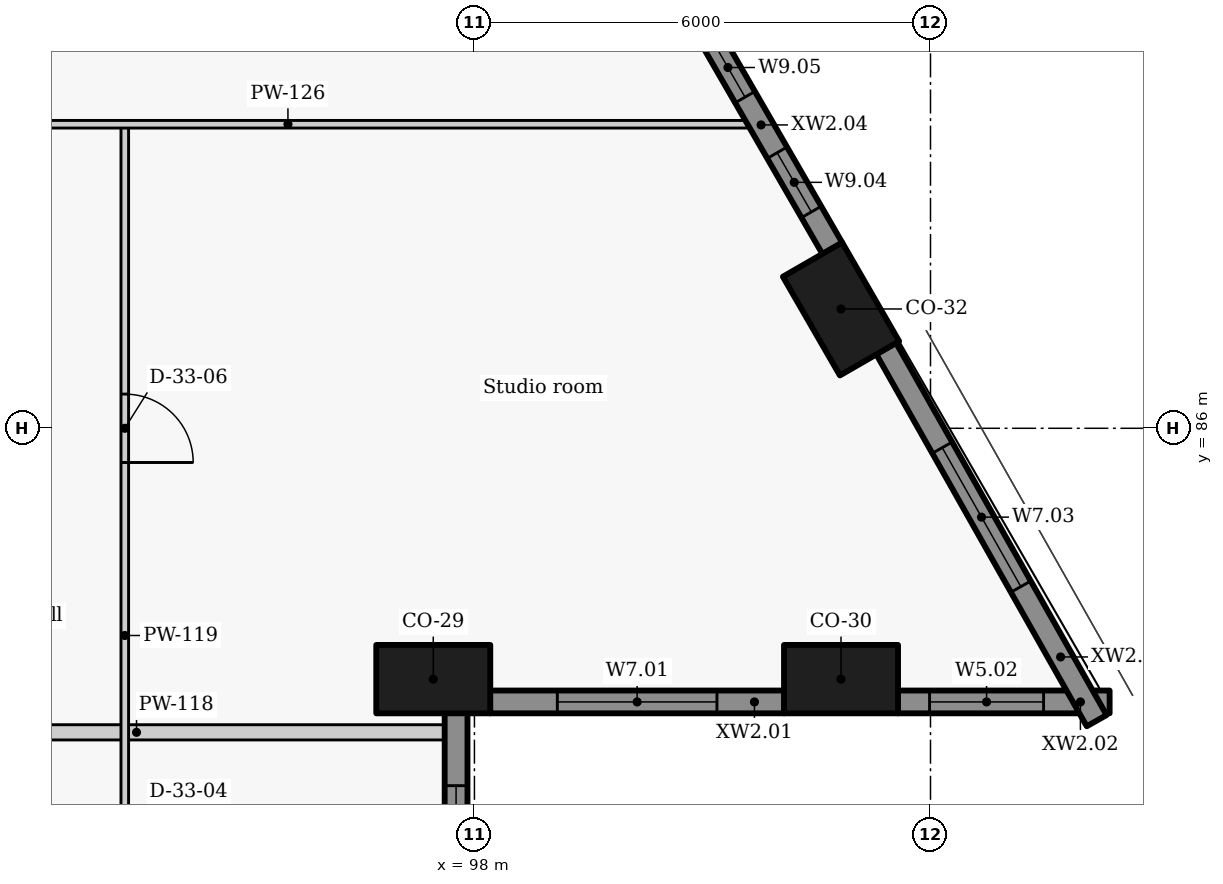
"""IFC4 building model, lengths in metres.
Left out: names, types, materials, properties, quantities, classifications, styles, units other than length and angle.
Written with IfcOpenShell. Run it as: python <this file> out.ifc"""

import sys

from ifc_helpers import new_model, si_unit, direction, frame, frame_2d, origin, origin_2d, place, context, subcontext, project, spatial, rectangle, extrude, element, fill, save


model = new_model("IFC4")
c1 = context("Model", 3, precision=1e-05, world=origin(), true_north=direction((0.0, 1.0)))
c2 = subcontext(c1, "Body", "Model", "MODEL_VIEW")
j1 = project(units=[si_unit("LENGTHUNIT", "METRE"), si_unit("PLANEANGLEUNIT", "RADIAN")], contexts=[c1])
p1 = place(None, origin())
s1 = spatial("IfcSite", under=j1, at=p1, CompositionType="ELEMENT")
p2 = place(p1, origin())
s2 = spatial("IfcBuilding", under=s1, at=p2, CompositionType="ELEMENT")
p3 = place(p2, frame((0.0, 0.0, 41.4)))
s3 = spatial("IfcBuildingStorey", under=s2, at=p3, CompositionType="ELEMENT", Elevation=41.4)
for number, where, z_axis, x_axis in (
    (1, (97.458, 82.7, -0.275), (0.0, 0.0, 1.0), (1.0, 0.0, 0.0)),
    (2, (102.823, 82.7, -0.275), (0.0, 0.0, 1.0), (1.0, 0.0, 0.0)),
    (3, (102.823, 87.57, -0.275), (0.0, 0.0, 1.0), (-0.5, 0.866, 0.0)),
):
    element("IfcColumn", number, at=place(p3, frame(where, z_axis=z_axis, x_axis=x_axis)), inside=s3, PredefinedType="COLUMN", context=c2, shape_type="SweptSolid", body=[
        extrude(rectangle(XDim=1.5, YDim=0.9, at=origin_2d()), origin(), (0.0, 0.0, 1.0), 3.575),
    ])
p4 = place(p3, frame((98.204, 82.4, 0.0), z_axis=(0.0, 0.0, 1.0), x_axis=(1.0, 0.0, 0.0)))
e4 = element("IfcWall", 4, at=p4, inside=s3, PredefinedType="SOLIDWALL", context=c2, shape_type="SweptSolid", body=[
    extrude(rectangle(XDim=3.873, YDim=0.3, at=frame_2d((1.936, 0.0))), origin(), (0.0, 0.0, 1.0), 2.425),
])
p5 = place(p4, frame((0.886, 0.0, 0.9)))
e5 = element("IfcOpeningElement", 5, at=p5, cuts=e4, PredefinedType="OPENING", context=c2, shape_type="SweptSolid", body=[
    extrude(rectangle(XDim=2.1, YDim=1.1, at=frame_2d((1.05, 0.55))), frame((0.0, 0.16, 0.0), z_axis=(0.0, -1.0, 0.0), x_axis=(1.0, 0.0, 0.0)), (0.0, 0.0, 1.0), 0.32),
])
p6 = place(p3, frame((103.569, 82.4, 0.0), z_axis=(0.0, 0.0, 1.0), x_axis=(1.0, 0.0, 0.0)))
e6 = element("IfcWall", 6, at=p6, inside=s3, PredefinedType="SOLIDWALL", context=c2, shape_type="SweptSolid", body=[
    extrude(rectangle(XDim=2.788, YDim=0.3, at=frame_2d((1.394, 0.0))), origin(), (0.0, 0.0, 1.0), 2.425),
])
p7 = place(p6, frame((0.419, 0.0, 0.9)))
e7 = element("IfcOpeningElement", 7, at=p7, cuts=e6, PredefinedType="OPENING", context=c2, shape_type="SweptSolid", body=[
    extrude(rectangle(XDim=1.5, YDim=1.1, at=frame_2d((0.75, 0.55))), frame((0.0, 0.16, 0.0), z_axis=(0.0, -1.0, 0.0), x_axis=(1.0, 0.0, 0.0)), (0.0, 0.0, 1.0), 0.32),
])
p8 = place(p3, frame((106.186, 82.153, 0.0), z_axis=(0.0, 0.0, 1.0), x_axis=(-0.492363204642, 0.870389840655, 0.0)))
e8 = element("IfcWall", 8, at=p8, inside=s3, PredefinedType="SOLIDWALL", context=c2, shape_type="SweptSolid", body=[
    extrude(rectangle(XDim=5.626, YDim=0.3, at=frame_2d((2.813, 0.0))), origin(), (0.0, 0.0, 1.0), 2.425),
])
p9 = place(p8, frame((2.026, 0.0, 0.9)))
e9 = element("IfcOpeningElement", 9, at=p9, cuts=e8, PredefinedType="OPENING", context=c2, shape_type="SweptSolid", body=[
    extrude(rectangle(XDim=2.1, YDim=1.1, at=frame_2d((1.05, 0.55))), frame((0.0, 0.16, 0.0), z_axis=(0.0, -1.0, 0.0), x_axis=(1.0, 0.0, 0.0)), (0.0, 0.0, 1.0), 0.32),
])
p10 = place(p3, frame((102.71, 88.366, 0.0), z_axis=(0.0, 0.0, 1.0), x_axis=(-0.499977402622, 0.866038449993, 0.0)))
e10 = element("IfcWall", 10, at=p10, inside=s3, PredefinedType="SOLIDWALL", context=c2, shape_type="SweptSolid", body=[
    extrude(rectangle(XDim=3.537, YDim=0.3, at=frame_2d((1.769, 0.0))), origin(), (0.0, 0.0, 1.0), 2.425),
])
p11 = place(p10, frame((0.555, 0.0, 0.9)))
e11 = element("IfcOpeningElement", 11, at=p11, cuts=e10, PredefinedType="OPENING", context=c2, shape_type="SweptSolid", body=[
    extrude(rectangle(XDim=0.9, YDim=1.1, at=frame_2d((0.45, 0.55))), frame((0.0, 0.16, 0.0), z_axis=(0.0, -1.0, 0.0), x_axis=(1.0, 0.0, 0.0)), (0.0, 0.0, 1.0), 0.32),
])
p12 = place(p10, frame((2.299, 0.0, 0.9)))
e12 = element("IfcOpeningElement", 12, at=p12, cuts=e10, PredefinedType="OPENING", context=c2, shape_type="SweptSolid", body=[
    extrude(rectangle(XDim=0.9, YDim=1.1, at=frame_2d((0.45, 0.55))), frame((0.0, 0.16, 0.0), z_axis=(0.0, -1.0, 0.0), x_axis=(1.0, 0.0, 0.0)), (0.0, 0.0, 1.0), 0.32),
])
p13 = place(p3, frame((97.758, 78.046, 0.0), z_axis=(0.0, 0.0, 1.0), x_axis=(0.0, 1.0, 0.0)))
e13 = element("IfcWall", 13, at=p13, inside=s3, PredefinedType="SOLIDWALL", context=c2, shape_type="SweptSolid", body=[
    extrude(rectangle(XDim=4.208, YDim=0.3, at=frame_2d((2.104, 0.0))), origin(), (0.0, 0.0, 1.0), 2.425),
])
p14 = place(p13, frame((1.752, 0.0, 0.9)))
e14 = element("IfcOpeningElement", 14, at=p14, cuts=e13, PredefinedType="OPENING", context=c2, shape_type="SweptSolid", body=[
    extrude(rectangle(XDim=1.5, YDim=1.1, at=frame_2d((0.75, 0.55))), frame((0.0, 0.16, 0.0), z_axis=(0.0, -1.0, 0.0), x_axis=(1.0, 0.0, 0.0)), (0.0, 0.0, 1.0), 0.32),
])
p15 = place(p3, frame((89.5, 82.0, 0.0), z_axis=(0.0, 0.0, 1.0), x_axis=(1.0, 0.0, 0.0)))
e15 = element("IfcWall", 15, at=p15, inside=s3, PredefinedType="PARTITIONING", context=c2, shape_type="SweptSolid", body=[
    extrude(rectangle(XDim=8.108, YDim=0.2, at=frame_2d((4.054, 0.0))), origin(), (0.0, 0.0, 1.0), 2.405),
])
p16 = place(p3, frame((93.4, 90.0, 0.0), z_axis=(0.0, 0.0, 1.0), x_axis=(0.0, -1.0, 0.0)))
e16 = element("IfcWall", 16, at=p16, inside=s3, PredefinedType="PARTITIONING", context=c2, shape_type="SweptSolid", body=[
    extrude(rectangle(XDim=18.0, YDim=0.1, at=frame_2d((9.0, 0.0))), origin(), (0.0, 0.0, 1.0), 3.025),
])
p17 = place(p16, frame((16.098, 0.0, 0.0)))
e17 = element("IfcOpeningElement", 17, at=p17, cuts=e16, PredefinedType="OPENING", context=c2, shape_type="SweptSolid", body=[
    extrude(rectangle(XDim=0.9, YDim=2.1, at=frame_2d((0.45, 1.05))), frame((0.0, 0.06, 0.0), z_axis=(0.0, -1.0, 0.0), x_axis=(1.0, 0.0, 0.0)), (0.0, 0.0, 1.0), 0.12),
])
p18 = place(p16, frame((12.55, 0.0, 0.0)))
e18 = element("IfcOpeningElement", 18, at=p18, cuts=e16, PredefinedType="OPENING", context=c2, shape_type="SweptSolid", body=[
    extrude(rectangle(XDim=0.9, YDim=2.1, at=frame_2d((0.45, 1.05))), frame((0.0, 0.06, 0.0), z_axis=(0.0, -1.0, 0.0), x_axis=(1.0, 0.0, 0.0)), (0.0, 0.0, 1.0), 0.12),
])
p19 = place(p16, frame((9.002, 0.0, 0.0)))
e19 = element("IfcOpeningElement", 19, at=p19, cuts=e16, PredefinedType="OPENING", context=c2, shape_type="SweptSolid", body=[
    extrude(rectangle(XDim=0.9, YDim=2.1, at=frame_2d((0.45, 1.05))), frame((0.0, 0.06, 0.0), z_axis=(0.0, -1.0, 0.0), x_axis=(1.0, 0.0, 0.0)), (0.0, 0.0, 1.0), 0.12),
])
p20 = place(p16, frame((3.55, 0.0, 0.0)))
e20 = element("IfcOpeningElement", 20, at=p20, cuts=e16, PredefinedType="OPENING", context=c2, shape_type="SweptSolid", body=[
    extrude(rectangle(XDim=0.9, YDim=2.1, at=frame_2d((0.45, 1.05))), frame((0.0, 0.06, 0.0), z_axis=(0.0, -1.0, 0.0), x_axis=(1.0, 0.0, 0.0)), (0.0, 0.0, 1.0), 0.12),
])
p21 = place(p3, frame((89.5, 90.0, 0.0), z_axis=(0.0, 0.0, 1.0), x_axis=(1.0, 0.0, 0.0)))
e21 = element("IfcWall", 21, at=p21, inside=s3, PredefinedType="PARTITIONING", context=c2, shape_type="SweptSolid", body=[
    extrude(rectangle(XDim=12.093, YDim=0.1, at=frame_2d((6.046, 0.0))), origin(), (0.0, 0.0, 1.0), 2.405),
])
p22 = place(p5, origin())
e22 = element("IfcWindow", 22, at=p22, inside=s3, PartitioningType="SINGLE_PANEL", PredefinedType="WINDOW", context=c2, shape_type="SweptSolid", body=[
    extrude(rectangle(XDim=2.1, YDim=1.1, at=frame_2d((1.05, 0.55))), frame((0.0, 0.03, 0.0), z_axis=(0.0, -1.0, 0.0), x_axis=(1.0, 0.0, 0.0)), (0.0, 0.0, 1.0), 0.06),
])
fill(e5, e22)
p23 = place(p7, origin())
e23 = element("IfcWindow", 23, at=p23, inside=s3, PartitioningType="SINGLE_PANEL", PredefinedType="WINDOW", context=c2, shape_type="SweptSolid", body=[
    extrude(rectangle(XDim=1.5, YDim=1.1, at=frame_2d((0.75, 0.55))), frame((0.0, 0.03, 0.0), z_axis=(0.0, -1.0, 0.0), x_axis=(1.0, 0.0, 0.0)), (0.0, 0.0, 1.0), 0.06),
])
fill(e7, e23)
p24 = place(p9, origin())
e24 = element("IfcWindow", 24, at=p24, inside=s3, PartitioningType="SINGLE_PANEL", PredefinedType="WINDOW", context=c2, shape_type="SweptSolid", body=[
    extrude(rectangle(XDim=2.1, YDim=1.1, at=frame_2d((1.05, 0.55))), frame((0.0, 0.03, 0.0), z_axis=(0.0, -1.0, 0.0), x_axis=(1.0, 0.0, 0.0)), (0.0, 0.0, 1.0), 0.06),
])
fill(e9, e24)
p25 = place(p11, origin())
e25 = element("IfcWindow", 25, at=p25, inside=s3, PartitioningType="SINGLE_PANEL", PredefinedType="WINDOW", context=c2, shape_type="SweptSolid", body=[
    extrude(rectangle(XDim=0.9, YDim=1.1, at=frame_2d((0.45, 0.55))), frame((0.0, 0.03, 0.0), z_axis=(0.0, -1.0, 0.0), x_axis=(1.0, 0.0, 0.0)), (0.0, 0.0, 1.0), 0.06),
])
fill(e11, e25)
p26 = place(p12, origin())
e26 = element("IfcWindow", 26, at=p26, inside=s3, PartitioningType="SINGLE_PANEL", PredefinedType="WINDOW", context=c2, shape_type="SweptSolid", body=[
    extrude(rectangle(XDim=0.9, YDim=1.1, at=frame_2d((0.45, 0.55))), frame((0.0, 0.03, 0.0), z_axis=(0.0, -1.0, 0.0), x_axis=(1.0, 0.0, 0.0)), (0.0, 0.0, 1.0), 0.06),
])
fill(e12, e26)
p27 = place(p14, origin())
e27 = element("IfcWindow", 27, at=p27, inside=s3, PartitioningType="SINGLE_PANEL", PredefinedType="WINDOW", context=c2, shape_type="SweptSolid", body=[
    extrude(rectangle(XDim=1.5, YDim=1.1, at=frame_2d((0.75, 0.55))), frame((0.0, 0.03, 0.0), z_axis=(0.0, -1.0, 0.0), x_axis=(1.0, 0.0, 0.0)), (0.0, 0.0, 1.0), 0.06),
])
fill(e14, e27)
p28 = place(p20, origin())
e28 = element("IfcDoor", 28, at=p28, inside=s3, OperationType="SINGLE_SWING_RIGHT", PredefinedType="DOOR", context=c2, shape_type="SweptSolid", body=[
    extrude(rectangle(XDim=0.9, YDim=2.1, at=frame_2d((0.45, 1.05))), frame((0.0, 0.025, 0.0), z_axis=(0.0, -1.0, 0.0), x_axis=(1.0, 0.0, 0.0)), (0.0, 0.0, 1.0), 0.05),
])
fill(e20, e28)
save(model, sys.argv[1])
